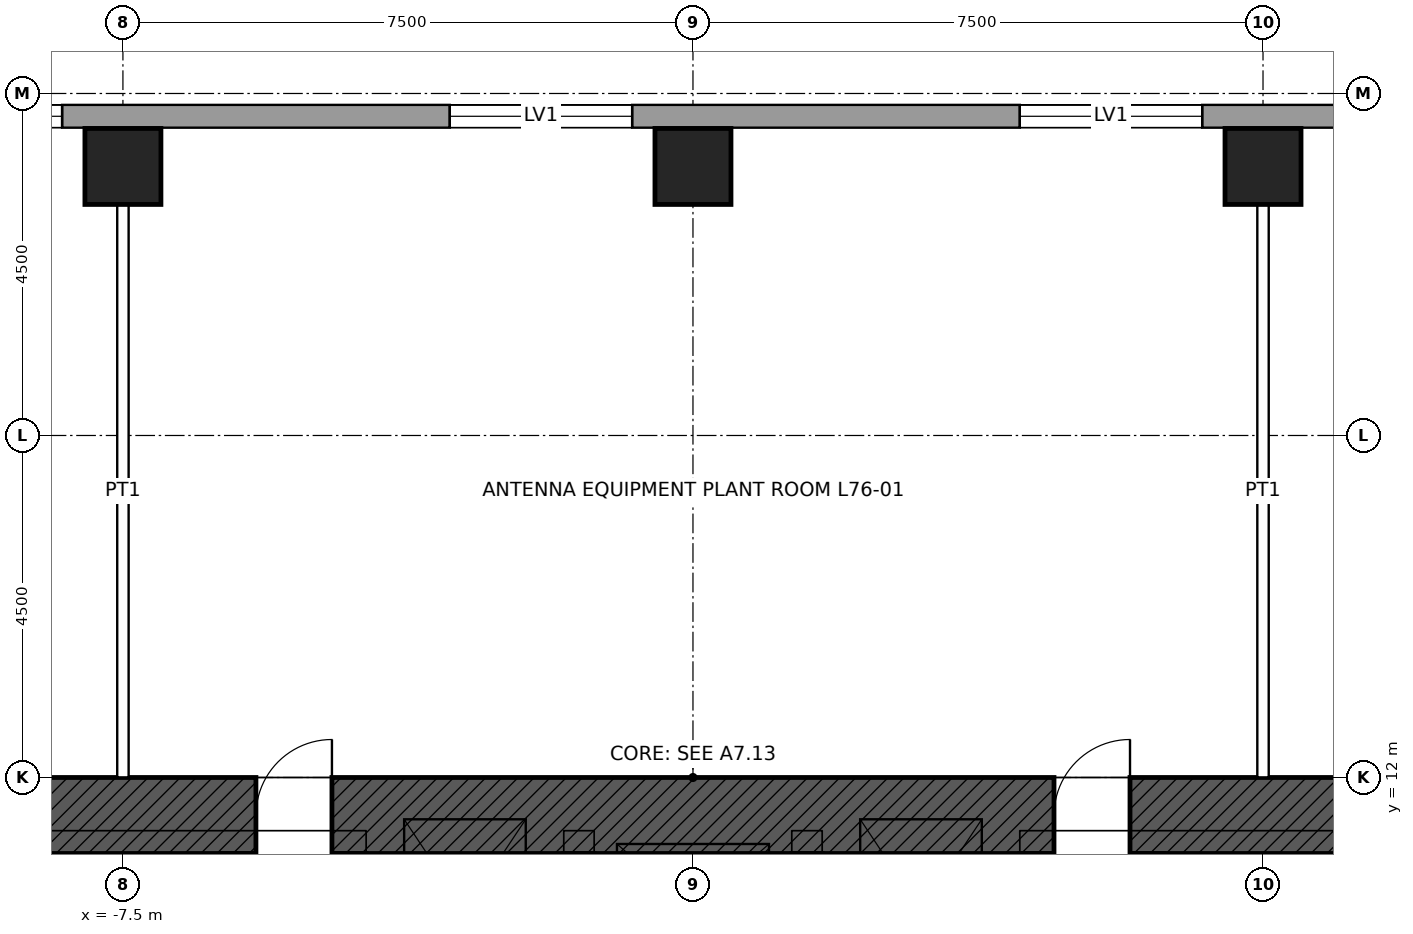
"""IFC4 building model, lengths in metres.
Left out: names, types, materials, properties, quantities, classifications, styles, units other than length and angle.
Written with IfcOpenShell. Run it as: python <this file> out.ifc"""

import sys

from ifc_helpers import new_model, si_unit, direction, frame, frame_2d, origin, origin_2d, place, context, subcontext, project, spatial, rectangle, hollow_rectangle, extrude, element, fill, save


model = new_model("IFC4")
c1 = context("Model", 3, precision=1e-05, world=origin(), true_north=direction((0.0, 1.0)))
c2 = subcontext(c1, "Body", "Model", "MODEL_VIEW")
j1 = project(units=[si_unit("LENGTHUNIT", "METRE"), si_unit("PLANEANGLEUNIT", "RADIAN")], contexts=[c1])
p1 = place(None, origin())
s1 = spatial("IfcSite", under=j1, at=p1, CompositionType="ELEMENT")
p2 = place(p1, origin())
s2 = spatial("IfcBuilding", under=s1, at=p2, CompositionType="ELEMENT")
p3 = place(p2, frame((0.0, 0.0, 341.9)))
s3 = spatial("IfcBuildingStorey", under=s2, at=p3, CompositionType="ELEMENT", Elevation=341.9)
for number, where, z_axis, x_axis in (
    (1, (-7.5, 20.04, 0.0), (0.0, 0.0, 1.0), (1.0, 0.0, 0.0)),
    (2, (0.0, 20.04, 0.0), (0.0, 0.0, 1.0), (1.0, 0.0, 0.0)),
    (3, (7.5, 20.04, 0.0), (0.0, 0.0, 1.0), (1.0, 0.0, 0.0)),
):
    element("IfcColumn", number, at=place(p3, frame(where, z_axis=z_axis, x_axis=x_axis)), inside=s3, PredefinedType="COLUMN", context=c2, shape_type="SweptSolid", body=[
        extrude(hollow_rectangle(XDim=1.0, YDim=1.0, WallThickness=0.075, at=origin_2d()), origin(), (0.0, 0.0, 1.0), 5.0),
    ])
p4 = place(p3, frame((-12.0, 11.5, 0.0), z_axis=(0.0, 0.0, 1.0), x_axis=(1.0, 0.0, 0.0)))
e4 = element("IfcWall", 4, at=p4, inside=s3, PredefinedType="SHEAR", context=c2, shape_type="SweptSolid", body=[
    extrude(rectangle(XDim=24.0, YDim=1.0, at=frame_2d((12.0, 0.0))), origin(), (0.0, 0.0, 1.0), 5.0),
])
p5 = place(p4, frame((6.25, 0.0, 0.0)))
e5 = element("IfcOpeningElement", 5, at=p5, cuts=e4, PredefinedType="OPENING", context=c2, shape_type="SweptSolid", body=[
    extrude(rectangle(XDim=1.0, YDim=2.4, at=frame_2d((0.5, 1.2))), frame((0.0, 0.51, 0.0), z_axis=(0.0, -1.0, 0.0), x_axis=(1.0, 0.0, 0.0)), (0.0, 0.0, 1.0), 1.02),
])
p6 = place(p4, frame((16.75, 0.0, 0.0)))
e6 = element("IfcOpeningElement", 6, at=p6, cuts=e4, PredefinedType="OPENING", context=c2, shape_type="SweptSolid", body=[
    extrude(rectangle(XDim=1.0, YDim=2.4, at=frame_2d((0.5, 1.2))), frame((0.0, 0.51, 0.0), z_axis=(0.0, -1.0, 0.0), x_axis=(1.0, 0.0, 0.0)), (0.0, 0.0, 1.0), 1.02),
])
p7 = place(p3, frame((-13.2, 20.7, 0.0), z_axis=(0.0, 0.0, 1.0), x_axis=(1.0, 0.0, 0.0)))
e7 = element("IfcWall", 7, at=p7, inside=s3, PredefinedType="SOLIDWALL", context=c2, shape_type="SweptSolid", body=[
    extrude(rectangle(XDim=26.4, YDim=0.3, at=frame_2d((13.2, 0.0))), origin(), (0.0, 0.0, 1.0), 4.8),
])
p8 = place(p7, frame((2.5, 0.0, 0.6)))
e8 = element("IfcOpeningElement", 8, at=p8, cuts=e7, PredefinedType="OPENING", context=c2, shape_type="SweptSolid", body=[
    extrude(rectangle(XDim=2.4, YDim=2.4, at=frame_2d((1.2, 1.2))), frame((0.0, 0.16, 0.0), z_axis=(0.0, -1.0, 0.0), x_axis=(1.0, 0.0, 0.0)), (0.0, 0.0, 1.0), 0.32),
])
p9 = place(p7, frame((10.0, 0.0, 0.6)))
e9 = element("IfcOpeningElement", 9, at=p9, cuts=e7, PredefinedType="OPENING", context=c2, shape_type="SweptSolid", body=[
    extrude(rectangle(XDim=2.4, YDim=2.4, at=frame_2d((1.2, 1.2))), frame((0.0, 0.16, 0.0), z_axis=(0.0, -1.0, 0.0), x_axis=(1.0, 0.0, 0.0)), (0.0, 0.0, 1.0), 0.32),
])
p10 = place(p7, frame((17.5, 0.0, 0.6)))
e10 = element("IfcOpeningElement", 10, at=p10, cuts=e7, PredefinedType="OPENING", context=c2, shape_type="SweptSolid", body=[
    extrude(rectangle(XDim=2.4, YDim=2.4, at=frame_2d((1.2, 1.2))), frame((0.0, 0.16, 0.0), z_axis=(0.0, -1.0, 0.0), x_axis=(1.0, 0.0, 0.0)), (0.0, 0.0, 1.0), 0.32),
])
for number, where, z_axis, x_axis in (
    (11, (-7.5, 12.0, 0.0), (0.0, 0.0, 1.0), (0.0, 1.0, 0.0)),
    (12, (7.5, 12.0, 0.0), (0.0, 0.0, 1.0), (0.0, 1.0, 0.0)),
):
    element("IfcWall", number, at=place(p3, frame(where, z_axis=z_axis, x_axis=x_axis)), inside=s3, PredefinedType="PARTITIONING", context=c2, shape_type="SweptSolid", body=[
        extrude(rectangle(XDim=7.54, YDim=0.15, at=frame_2d((3.77, 0.0))), origin(), (0.0, 0.0, 1.0), 4.193),
    ])
p11 = place(p8, origin())
e13 = element("IfcWindow", 13, at=p11, inside=s3, PartitioningType="SINGLE_PANEL", PredefinedType="WINDOW", context=c2, shape_type="SweptSolid", body=[
    extrude(rectangle(XDim=2.4, YDim=2.4, at=frame_2d((1.2, 1.2))), frame((0.0, 0.15, 0.0), z_axis=(0.0, -1.0, 0.0), x_axis=(1.0, 0.0, 0.0)), (0.0, 0.0, 1.0), 0.06),
])
fill(e8, e13)
p12 = place(p9, origin())
e14 = element("IfcWindow", 14, at=p12, inside=s3, PartitioningType="SINGLE_PANEL", PredefinedType="WINDOW", context=c2, shape_type="SweptSolid", body=[
    extrude(rectangle(XDim=2.4, YDim=2.4, at=frame_2d((1.2, 1.2))), frame((0.0, 0.15, 0.0), z_axis=(0.0, -1.0, 0.0), x_axis=(1.0, 0.0, 0.0)), (0.0, 0.0, 1.0), 0.06),
])
fill(e9, e14)
p13 = place(p10, origin())
e15 = element("IfcWindow", 15, at=p13, inside=s3, PartitioningType="SINGLE_PANEL", PredefinedType="WINDOW", context=c2, shape_type="SweptSolid", body=[
    extrude(rectangle(XDim=2.4, YDim=2.4, at=frame_2d((1.2, 1.2))), frame((0.0, 0.15, 0.0), z_axis=(0.0, -1.0, 0.0), x_axis=(1.0, 0.0, 0.0)), (0.0, 0.0, 1.0), 0.06),
])
fill(e10, e15)
p14 = place(p2, frame((0.0, 0.0, 346.9)))
p15 = place(p14, frame((0.0, 0.0, -0.2)))
p16 = place(p15, frame((1.875, 16.5, 0.0)))
p17 = place(p16, frame((0.0, 0.0, 0.15)))
e16 = element("IfcDoor", 16, at=p17, inside=s3, OperationType="SINGLE_SWING_LEFT", PredefinedType="TRAPDOOR", context=c2, shape_type="SweptSolid", body=[
    extrude(rectangle(XDim=1.0, YDim=1.0, at=origin_2d()), origin(), (0.0, 0.0, 1.0), 0.05),
])
p18 = place(p5, origin())
e17 = element("IfcDoor", 17, at=p18, inside=s3, OperationType="SINGLE_SWING_RIGHT", PredefinedType="DOOR", context=c2, shape_type="SweptSolid", body=[
    extrude(rectangle(XDim=1.0, YDim=2.4, at=frame_2d((0.5, 1.2))), frame((0.0, 0.485, 0.0), z_axis=(0.0, -1.0, 0.0), x_axis=(1.0, 0.0, 0.0)), (0.0, 0.0, 1.0), 0.05),
])
fill(e5, e17)
p19 = place(p6, origin())
e18 = element("IfcDoor", 18, at=p19, inside=s3, OperationType="SINGLE_SWING_RIGHT", PredefinedType="DOOR", context=c2, shape_type="SweptSolid", body=[
    extrude(rectangle(XDim=1.0, YDim=2.4, at=frame_2d((0.5, 1.2))), frame((0.0, 0.485, 0.0), z_axis=(0.0, -1.0, 0.0), x_axis=(1.0, 0.0, 0.0)), (0.0, 0.0, 1.0), 0.05),
])
fill(e6, e18)
save(model, sys.argv[1])
